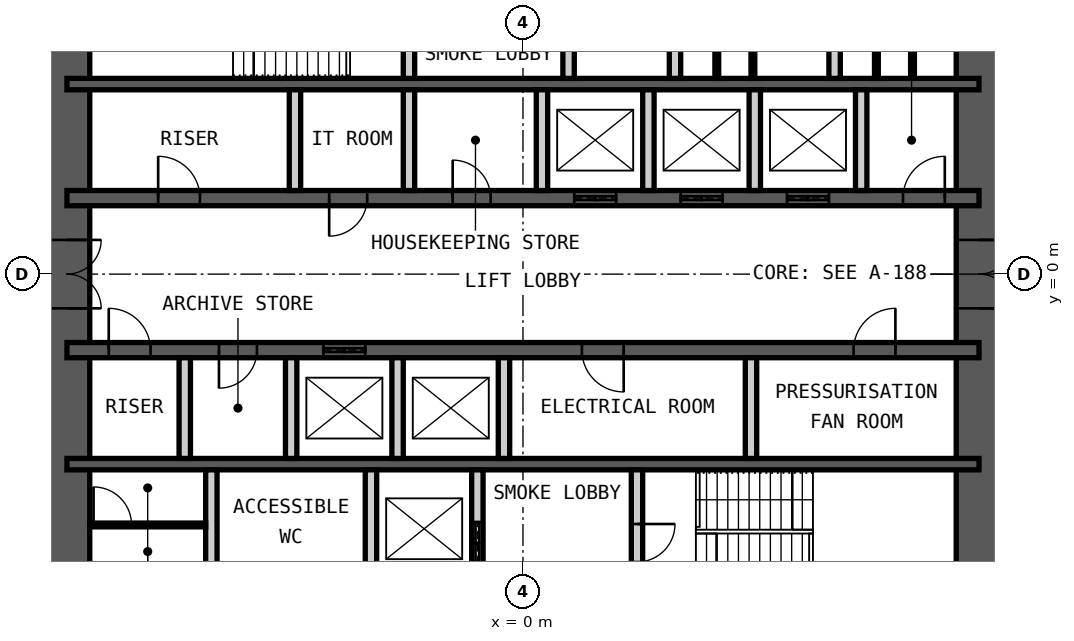
"""IFC4 building model, lengths in metres.
Left out: names, types, materials, properties, quantities, classifications, styles, units other than length and angle.
Written with IfcOpenShell. Run it as: python <this file> out.ifc"""

import sys

from ifc_helpers import new_model, si_unit, direction, frame, frame_2d, origin, place, context, subcontext, project, spatial, rectangle, extrude, element, fill, save


model = new_model("IFC4")
c1 = context("Model", 3, precision=1e-05, world=origin(), true_north=direction((0.0, 1.0)))
c2 = subcontext(c1, "Body", "Model", "MODEL_VIEW")
j1 = project(units=[si_unit("LENGTHUNIT", "METRE"), si_unit("PLANEANGLEUNIT", "RADIAN")], contexts=[c1])
p1 = place(None, origin())
s1 = spatial("IfcSite", under=j1, at=p1, CompositionType="ELEMENT")
p2 = place(p1, origin())
s2 = spatial("IfcBuilding", under=s1, at=p2, CompositionType="ELEMENT")
p3 = place(p2, frame((0.0, 0.0, 180.4)))
s3 = spatial("IfcBuildingStorey", under=s2, at=p3, CompositionType="ELEMENT", Elevation=180.4)
p4 = place(p3, frame((12.0, -9.0, 0.0), z_axis=(0.0, 0.0, 1.0), x_axis=(0.0, 1.0, 0.0)))
e1 = element("IfcWall", 1, at=p4, inside=s3, PredefinedType="SHEAR", context=c2, shape_type="SweptSolid", body=[
    extrude(rectangle(XDim=18.0, YDim=1.2, at=frame_2d((9.0, 0.0))), origin(), (0.0, 0.0, 1.0), 4.2),
])
p5 = place(p4, frame((8.1, 0.0, 0.0)))
e2 = element("IfcOpeningElement", 2, at=p5, cuts=e1, PredefinedType="OPENING", context=c2, shape_type="SweptSolid", body=[
    extrude(rectangle(XDim=1.8, YDim=2.1, at=frame_2d((0.9, 1.05))), frame((0.0, 0.61, 0.0), z_axis=(0.0, -1.0, 0.0), x_axis=(1.0, 0.0, 0.0)), (0.0, 0.0, 1.0), 1.22),
])
p6 = place(p3, frame((-12.0, -9.0, 0.0), z_axis=(0.0, 0.0, 1.0), x_axis=(0.0, 1.0, 0.0)))
e3 = element("IfcWall", 3, at=p6, inside=s3, PredefinedType="SHEAR", context=c2, shape_type="SweptSolid", body=[
    extrude(rectangle(XDim=18.0, YDim=1.2, at=frame_2d((9.0, 0.0))), origin(), (0.0, 0.0, 1.0), 4.2),
])
p7 = place(p6, frame((8.1, 0.0, 0.0)))
e4 = element("IfcOpeningElement", 4, at=p7, cuts=e3, PredefinedType="OPENING", context=c2, shape_type="SweptSolid", body=[
    extrude(rectangle(XDim=1.8, YDim=2.1, at=frame_2d((0.9, 1.05))), frame((0.0, 0.61, 0.0), z_axis=(0.0, -1.0, 0.0), x_axis=(1.0, 0.0, 0.0)), (0.0, 0.0, 1.0), 1.22),
])
p8 = place(p3, frame((-12.0, 5.0, 0.0), z_axis=(0.0, 0.0, 1.0), x_axis=(1.0, 0.0, 0.0)))
e5 = element("IfcWall", 5, at=p8, inside=s3, PredefinedType="SHEAR", context=c2, shape_type="SweptSolid", body=[
    extrude(rectangle(XDim=24.0, YDim=0.3, at=frame_2d((12.0, 0.0))), origin(), (0.0, 0.0, 1.0), 4.2),
])
p9 = place(p3, frame((-12.0, 2.0, 0.0), z_axis=(0.0, 0.0, 1.0), x_axis=(1.0, 0.0, 0.0)))
e6 = element("IfcWall", 6, at=p9, inside=s3, PredefinedType="SHEAR", context=c2, shape_type="SweptSolid", body=[
    extrude(rectangle(XDim=24.0, YDim=0.4, at=frame_2d((12.0, 0.0))), origin(), (0.0, 0.0, 1.0), 4.2),
])
p10 = place(p9, frame((2.4, 0.0, 0.0)))
e7 = element("IfcOpeningElement", 7, at=p10, cuts=e6, PredefinedType="OPENING", context=c2, shape_type="SweptSolid", body=[
    extrude(rectangle(XDim=1.1, YDim=2.1, at=frame_2d((0.55, 1.05))), frame((0.0, 0.21, 0.0), z_axis=(0.0, -1.0, 0.0), x_axis=(1.0, 0.0, 0.0)), (0.0, 0.0, 1.0), 0.42),
])
p11 = place(p9, frame((22.0, 0.0, 0.0)))
e8 = element("IfcOpeningElement", 8, at=p11, cuts=e6, PredefinedType="OPENING", context=c2, shape_type="SweptSolid", body=[
    extrude(rectangle(XDim=1.1, YDim=2.1, at=frame_2d((0.55, 1.05))), frame((0.0, 0.21, 0.0), z_axis=(0.0, -1.0, 0.0), x_axis=(1.0, 0.0, 0.0)), (0.0, 0.0, 1.0), 0.42),
])
p12 = place(p9, frame((10.15, 0.0, 0.0)))
e9 = element("IfcOpeningElement", 9, at=p12, cuts=e6, PredefinedType="OPENING", context=c2, shape_type="SweptSolid", body=[
    extrude(rectangle(XDim=1.0, YDim=2.1, at=frame_2d((0.5, 1.05))), frame((0.0, 0.21, 0.0), z_axis=(0.0, -1.0, 0.0), x_axis=(1.0, 0.0, 0.0)), (0.0, 0.0, 1.0), 0.42),
])
p13 = place(p9, frame((6.9, 0.0, 0.0)))
e10 = element("IfcOpeningElement", 10, at=p13, cuts=e6, PredefinedType="OPENING", context=c2, shape_type="SweptSolid", body=[
    extrude(rectangle(XDim=1.0, YDim=2.1, at=frame_2d((0.5, 1.05))), frame((0.0, 0.21, 0.0), z_axis=(0.0, -1.0, 0.0), x_axis=(1.0, 0.0, 0.0)), (0.0, 0.0, 1.0), 0.42),
])
p14 = place(p9, frame((13.35, 0.0, 0.0)))
e11 = element("IfcOpeningElement", 11, at=p14, cuts=e6, PredefinedType="OPENING", context=c2, shape_type="SweptSolid", body=[
    extrude(rectangle(XDim=1.1, YDim=2.4, at=frame_2d((0.55, 1.2))), frame((0.0, 0.21, 0.0), z_axis=(0.0, -1.0, 0.0), x_axis=(1.0, 0.0, 0.0)), (0.0, 0.0, 1.0), 0.42),
])
p15 = place(p9, frame((16.15, 0.0, 0.0)))
e12 = element("IfcOpeningElement", 12, at=p15, cuts=e6, PredefinedType="OPENING", context=c2, shape_type="SweptSolid", body=[
    extrude(rectangle(XDim=1.1, YDim=2.4, at=frame_2d((0.55, 1.2))), frame((0.0, 0.21, 0.0), z_axis=(0.0, -1.0, 0.0), x_axis=(1.0, 0.0, 0.0)), (0.0, 0.0, 1.0), 0.42),
])
p16 = place(p9, frame((18.95, 0.0, 0.0)))
e13 = element("IfcOpeningElement", 13, at=p16, cuts=e6, PredefinedType="OPENING", context=c2, shape_type="SweptSolid", body=[
    extrude(rectangle(XDim=1.1, YDim=2.4, at=frame_2d((0.55, 1.2))), frame((0.0, 0.21, 0.0), z_axis=(0.0, -1.0, 0.0), x_axis=(1.0, 0.0, 0.0)), (0.0, 0.0, 1.0), 0.42),
])
p17 = place(p3, frame((-12.0, -2.0, 0.0), z_axis=(0.0, 0.0, 1.0), x_axis=(1.0, 0.0, 0.0)))
e14 = element("IfcWall", 14, at=p17, inside=s3, PredefinedType="SHEAR", context=c2, shape_type="SweptSolid", body=[
    extrude(rectangle(XDim=24.0, YDim=0.4, at=frame_2d((12.0, 0.0))), origin(), (0.0, 0.0, 1.0), 4.2),
])
p18 = place(p17, frame((1.1, 0.0, 0.0)))
e15 = element("IfcOpeningElement", 15, at=p18, cuts=e14, PredefinedType="OPENING", context=c2, shape_type="SweptSolid", body=[
    extrude(rectangle(XDim=1.1, YDim=2.1, at=frame_2d((0.55, 1.05))), frame((0.0, 0.21, 0.0), z_axis=(0.0, -1.0, 0.0), x_axis=(1.0, 0.0, 0.0)), (0.0, 0.0, 1.0), 0.42),
])
p19 = place(p17, frame((13.55, 0.0, 0.0)))
e16 = element("IfcOpeningElement", 16, at=p19, cuts=e14, PredefinedType="OPENING", context=c2, shape_type="SweptSolid", body=[
    extrude(rectangle(XDim=1.1, YDim=2.1, at=frame_2d((0.55, 1.05))), frame((0.0, 0.21, 0.0), z_axis=(0.0, -1.0, 0.0), x_axis=(1.0, 0.0, 0.0)), (0.0, 0.0, 1.0), 0.42),
])
p20 = place(p17, frame((20.7, 0.0, 0.0)))
e17 = element("IfcOpeningElement", 17, at=p20, cuts=e14, PredefinedType="OPENING", context=c2, shape_type="SweptSolid", body=[
    extrude(rectangle(XDim=1.1, YDim=2.1, at=frame_2d((0.55, 1.05))), frame((0.0, 0.21, 0.0), z_axis=(0.0, -1.0, 0.0), x_axis=(1.0, 0.0, 0.0)), (0.0, 0.0, 1.0), 0.42),
])
p21 = place(p17, frame((4.0, 0.0, 0.0)))
e18 = element("IfcOpeningElement", 18, at=p21, cuts=e14, PredefinedType="OPENING", context=c2, shape_type="SweptSolid", body=[
    extrude(rectangle(XDim=1.0, YDim=2.1, at=frame_2d((0.5, 1.05))), frame((0.0, 0.21, 0.0), z_axis=(0.0, -1.0, 0.0), x_axis=(1.0, 0.0, 0.0)), (0.0, 0.0, 1.0), 0.42),
])
p22 = place(p17, frame((6.75, 0.0, 0.0)))
e19 = element("IfcOpeningElement", 19, at=p22, cuts=e14, PredefinedType="OPENING", context=c2, shape_type="SweptSolid", body=[
    extrude(rectangle(XDim=1.1, YDim=2.4, at=frame_2d((0.55, 1.2))), frame((0.0, 0.21, 0.0), z_axis=(0.0, -1.0, 0.0), x_axis=(1.0, 0.0, 0.0)), (0.0, 0.0, 1.0), 0.42),
])
p23 = place(p3, frame((-12.0, -5.0, 0.0), z_axis=(0.0, 0.0, 1.0), x_axis=(1.0, 0.0, 0.0)))
e20 = element("IfcWall", 20, at=p23, inside=s3, PredefinedType="SHEAR", context=c2, shape_type="SweptSolid", body=[
    extrude(rectangle(XDim=24.0, YDim=0.3, at=frame_2d((12.0, 0.0))), origin(), (0.0, 0.0, 1.0), 4.2),
])
p24 = place(p3, frame((-3.0, 5.15, 0.0), z_axis=(0.0, 0.0, 1.0), x_axis=(0.0, 1.0, 0.0)))
e21 = element("IfcWall", 21, at=p24, inside=s3, PredefinedType="PARTITIONING", context=c2, shape_type="SweptSolid", body=[
    extrude(rectangle(XDim=3.85, YDim=0.3, at=frame_2d((1.925, 0.0))), origin(), (0.0, 0.0, 1.0), 3.98),
])
p25 = place(p24, frame((1.425, 0.0, 0.0)))
e22 = element("IfcOpeningElement", 22, at=p25, cuts=e21, PredefinedType="OPENING", context=c2, shape_type="SweptSolid", body=[
    extrude(rectangle(XDim=1.0, YDim=2.1, at=frame_2d((0.5, 1.05))), frame((0.0, 0.16, 0.0), z_axis=(0.0, -1.0, 0.0), x_axis=(1.0, 0.0, 0.0)), (0.0, 0.0, 1.0), 0.32),
])
p26 = place(p3, frame((1.2, 5.15, 0.0), z_axis=(0.0, 0.0, 1.0), x_axis=(0.0, 1.0, 0.0)))
e23 = element("IfcWall", 23, at=p26, inside=s3, PredefinedType="PARTITIONING", context=c2, shape_type="SweptSolid", body=[
    extrude(rectangle(XDim=3.85, YDim=0.3, at=frame_2d((1.925, 0.0))), origin(), (0.0, 0.0, 1.0), 3.98),
])
p27 = place(p26, frame((1.375, 0.0, 0.0)))
e24 = element("IfcOpeningElement", 24, at=p27, cuts=e23, PredefinedType="OPENING", context=c2, shape_type="SweptSolid", body=[
    extrude(rectangle(XDim=1.1, YDim=2.4, at=frame_2d((0.55, 1.2))), frame((0.0, 0.16, 0.0), z_axis=(0.0, -1.0, 0.0), x_axis=(1.0, 0.0, 0.0)), (0.0, 0.0, 1.0), 0.32),
])
for number, where, z_axis, x_axis in (
    (25, (4.0, 5.15, 0.0), (0.0, 0.0, 1.0), (0.0, 1.0, 0.0)),
    (26, (8.2, 5.15, 0.0), (0.0, 0.0, 1.0), (0.0, 1.0, 0.0)),
):
    element("IfcWall", number, at=place(p3, frame(where, z_axis=z_axis, x_axis=x_axis)), inside=s3, PredefinedType="PARTITIONING", context=c2, shape_type="SweptSolid", body=[
        extrude(rectangle(XDim=3.85, YDim=0.3, at=frame_2d((1.925, 0.0))), origin(), (0.0, 0.0, 1.0), 3.98),
    ])
for number, where, z_axis, x_axis in (
    (27, (-6.0, 2.2, 0.0), (0.0, 0.0, 1.0), (0.0, 1.0, 0.0)),
    (28, (-3.0, 2.2, 0.0), (0.0, 0.0, 1.0), (0.0, 1.0, 0.0)),
    (29, (0.5, 2.2, 0.0), (0.0, 0.0, 1.0), (0.0, 1.0, 0.0)),
    (30, (3.3, 2.2, 0.0), (0.0, 0.0, 1.0), (0.0, 1.0, 0.0)),
    (31, (6.1, 2.2, 0.0), (0.0, 0.0, 1.0), (0.0, 1.0, 0.0)),
    (32, (8.9, 2.2, 0.0), (0.0, 0.0, 1.0), (0.0, 1.0, 0.0)),
    (33, (-8.9, -4.85, 0.0), (0.0, 0.0, 1.0), (0.0, 1.0, 0.0)),
    (34, (-6.1, -4.85, 0.0), (0.0, 0.0, 1.0), (0.0, 1.0, 0.0)),
    (35, (-3.3, -4.85, 0.0), (0.0, 0.0, 1.0), (0.0, 1.0, 0.0)),
    (36, (-0.5, -4.85, 0.0), (0.0, 0.0, 1.0), (0.0, 1.0, 0.0)),
    (37, (6.0, -4.85, 0.0), (0.0, 0.0, 1.0), (0.0, 1.0, 0.0)),
):
    element("IfcWall", number, at=place(p3, frame(where, z_axis=z_axis, x_axis=x_axis)), inside=s3, PredefinedType="PARTITIONING", context=c2, shape_type="SweptSolid", body=[
        extrude(rectangle(XDim=2.65, YDim=0.3, at=frame_2d((1.325, 0.0))), origin(), (0.0, 0.0, 1.0), 3.98),
    ])
for number, where, z_axis, x_axis in (
    (38, (-8.2, -9.0, 0.0), (0.0, 0.0, 1.0), (0.0, 1.0, 0.0)),
    (39, (-4.0, -9.0, 0.0), (0.0, 0.0, 1.0), (0.0, 1.0, 0.0)),
):
    element("IfcWall", number, at=place(p3, frame(where, z_axis=z_axis, x_axis=x_axis)), inside=s3, PredefinedType="PARTITIONING", context=c2, shape_type="SweptSolid", body=[
        extrude(rectangle(XDim=3.85, YDim=0.3, at=frame_2d((1.925, 0.0))), origin(), (0.0, 0.0, 1.0), 3.98),
    ])
p28 = place(p3, frame((-1.2, -9.0, 0.0), z_axis=(0.0, 0.0, 1.0), x_axis=(0.0, 1.0, 0.0)))
e40 = element("IfcWall", 40, at=p28, inside=s3, PredefinedType="PARTITIONING", context=c2, shape_type="SweptSolid", body=[
    extrude(rectangle(XDim=3.85, YDim=0.3, at=frame_2d((1.925, 0.0))), origin(), (0.0, 0.0, 1.0), 3.98),
])
p29 = place(p28, frame((1.375, 0.0, 0.0)))
e41 = element("IfcOpeningElement", 41, at=p29, cuts=e40, PredefinedType="OPENING", context=c2, shape_type="SweptSolid", body=[
    extrude(rectangle(XDim=1.1, YDim=2.4, at=frame_2d((0.55, 1.2))), frame((0.0, 0.16, 0.0), z_axis=(0.0, -1.0, 0.0), x_axis=(1.0, 0.0, 0.0)), (0.0, 0.0, 1.0), 0.32),
])
p30 = place(p3, frame((3.0, -9.0, 0.0), z_axis=(0.0, 0.0, 1.0), x_axis=(0.0, 1.0, 0.0)))
e42 = element("IfcWall", 42, at=p30, inside=s3, PredefinedType="PARTITIONING", context=c2, shape_type="SweptSolid", body=[
    extrude(rectangle(XDim=3.85, YDim=0.3, at=frame_2d((1.925, 0.0))), origin(), (0.0, 0.0, 1.0), 3.98),
])
p31 = place(p30, frame((1.425, 0.0, 0.0)))
e43 = element("IfcOpeningElement", 43, at=p31, cuts=e42, PredefinedType="OPENING", context=c2, shape_type="SweptSolid", body=[
    extrude(rectangle(XDim=1.0, YDim=2.1, at=frame_2d((0.5, 1.05))), frame((0.0, 0.16, 0.0), z_axis=(0.0, -1.0, 0.0), x_axis=(1.0, 0.0, 0.0)), (0.0, 0.0, 1.0), 0.32),
])
p32 = place(p3, frame((-11.4, -6.6, 0.0), z_axis=(0.0, 0.0, 1.0), x_axis=(1.0, 0.0, 0.0)))
e44 = element("IfcWall", 44, at=p32, inside=s3, PredefinedType="PARTITIONING", context=c2, shape_type="SweptSolid", body=[
    extrude(rectangle(XDim=3.05, YDim=0.1, at=frame_2d((1.525, 0.0))), origin(), (0.0, 0.0, 1.0), 3.98),
])
p33 = place(p32, frame((0.1, 0.0, 0.0)))
e45 = element("IfcOpeningElement", 45, at=p33, cuts=e44, PredefinedType="OPENING", context=c2, shape_type="SweptSolid", body=[
    extrude(rectangle(XDim=1.0, YDim=2.4, at=frame_2d((0.5, 1.2))), frame((0.0, 0.06, 0.0), z_axis=(0.0, -1.0, 0.0), x_axis=(1.0, 0.0, 0.0)), (0.0, 0.0, 1.0), 0.12),
])
for number, where, z_axis, x_axis in (
    (46, (5.1, 5.15, 0.0), (0.0, 0.0, 1.0), (0.0, 1.0, 0.0)),
    (47, (6.05, 5.15, 0.0), (0.0, 0.0, 1.0), (0.0, 1.0, 0.0)),
    (48, (9.3, 5.15, 0.0), (0.0, 0.0, 1.0), (0.0, 1.0, 0.0)),
    (49, (10.25, 5.15, 0.0), (0.0, 0.0, 1.0), (0.0, 1.0, 0.0)),
):
    element("IfcWall", number, at=place(p3, frame(where, z_axis=z_axis, x_axis=x_axis)), inside=s3, PredefinedType="PARTITIONING", context=c2, shape_type="SweptSolid", body=[
        extrude(rectangle(XDim=1.5, YDim=0.1, at=frame_2d((0.75, 0.0))), origin(), (0.0, 0.0, 1.0), 2.1),
    ])
p34 = place(p31, origin())
e50 = element("IfcDoor", 50, at=p34, inside=s3, OperationType="SINGLE_SWING_RIGHT", PredefinedType="DOOR", context=c2, shape_type="SweptSolid", body=[
    extrude(rectangle(XDim=1.0, YDim=2.1, at=frame_2d((0.5, 1.05))), frame((0.0, 0.025, 0.0), z_axis=(0.0, -1.0, 0.0), x_axis=(1.0, 0.0, 0.0)), (0.0, 0.0, 1.0), 0.05),
])
fill(e43, e50)
p35 = place(p10, origin())
e51 = element("IfcDoor", 51, at=p35, inside=s3, OperationType="SINGLE_SWING_RIGHT", PredefinedType="DOOR", context=c2, shape_type="SweptSolid", body=[
    extrude(rectangle(XDim=1.1, YDim=2.1, at=frame_2d((0.55, 1.05))), frame((0.0, 0.025, 0.0), z_axis=(0.0, -1.0, 0.0), x_axis=(1.0, 0.0, 0.0)), (0.0, 0.0, 1.0), 0.05),
])
fill(e7, e51)
p36 = place(p18, origin())
e52 = element("IfcDoor", 52, at=p36, inside=s3, OperationType="SINGLE_SWING_RIGHT", PredefinedType="DOOR", context=c2, shape_type="SweptSolid", body=[
    extrude(rectangle(XDim=1.1, YDim=2.1, at=frame_2d((0.55, 1.05))), frame((0.0, 0.025, 0.0), z_axis=(0.0, -1.0, 0.0), x_axis=(1.0, 0.0, 0.0)), (0.0, 0.0, 1.0), 0.05),
])
fill(e15, e52)
p37 = place(p11, origin())
e53 = element("IfcDoor", 53, at=p37, inside=s3, OperationType="SINGLE_SWING_LEFT", PredefinedType="DOOR", context=c2, shape_type="SweptSolid", body=[
    extrude(rectangle(XDim=1.1, YDim=2.1, at=frame_2d((0.55, 1.05))), frame((0.0, 0.025, 0.0), z_axis=(0.0, -1.0, 0.0), x_axis=(1.0, 0.0, 0.0)), (0.0, 0.0, 1.0), 0.05),
])
fill(e8, e53)
p38 = place(p12, origin())
e54 = element("IfcDoor", 54, at=p38, inside=s3, OperationType="SINGLE_SWING_RIGHT", PredefinedType="DOOR", context=c2, shape_type="SweptSolid", body=[
    extrude(rectangle(XDim=1.0, YDim=2.1, at=frame_2d((0.5, 1.05))), frame((0.0, 0.025, 0.0), z_axis=(0.0, -1.0, 0.0), x_axis=(1.0, 0.0, 0.0)), (0.0, 0.0, 1.0), 0.05),
])
fill(e9, e54)
p39 = place(p19, origin())
e55 = element("IfcDoor", 55, at=p39, inside=s3, OperationType="SINGLE_SWING_RIGHT", PredefinedType="DOOR", context=c2, shape_type="SweptSolid", body=[
    extrude(rectangle(XDim=1.1, YDim=2.1, at=frame_2d((0.55, 1.05))), frame((0.0, 0.025, 0.0), z_axis=(0.0, -1.0, 0.0), x_axis=(1.0, 0.0, 0.0)), (0.0, 0.0, 1.0), 0.05),
])
fill(e16, e55)
p40 = place(p20, origin())
e56 = element("IfcDoor", 56, at=p40, inside=s3, OperationType="SINGLE_SWING_LEFT", PredefinedType="DOOR", context=c2, shape_type="SweptSolid", body=[
    extrude(rectangle(XDim=1.1, YDim=2.1, at=frame_2d((0.55, 1.05))), frame((0.0, 0.025, 0.0), z_axis=(0.0, -1.0, 0.0), x_axis=(1.0, 0.0, 0.0)), (0.0, 0.0, 1.0), 0.05),
])
fill(e17, e56)
p41 = place(p5, origin())
e57 = element("IfcDoor", 57, at=p41, inside=s3, OperationType="DOUBLE_DOOR_DOUBLE_SWING", PredefinedType="DOOR", context=c2, shape_type="SweptSolid", body=[
    extrude(rectangle(XDim=1.8, YDim=2.1, at=frame_2d((0.9, 1.05))), frame((0.0, 0.025, 0.0), z_axis=(0.0, -1.0, 0.0), x_axis=(1.0, 0.0, 0.0)), (0.0, 0.0, 1.0), 0.05),
])
fill(e2, e57)
p42 = place(p7, origin())
e58 = element("IfcDoor", 58, at=p42, inside=s3, OperationType="DOUBLE_DOOR_DOUBLE_SWING", PredefinedType="DOOR", context=c2, shape_type="SweptSolid", body=[
    extrude(rectangle(XDim=1.8, YDim=2.1, at=frame_2d((0.9, 1.05))), frame((0.0, 0.025, 0.0), z_axis=(0.0, -1.0, 0.0), x_axis=(1.0, 0.0, 0.0)), (0.0, 0.0, 1.0), 0.05),
])
fill(e4, e58)
p43 = place(p29, origin())
e59 = element("IfcDoor", 59, at=p43, inside=s3, OperationType="DOUBLE_DOOR_SLIDING", PredefinedType="DOOR", context=c2, shape_type="SweptSolid", body=[
    extrude(rectangle(XDim=1.1, YDim=2.4, at=frame_2d((0.55, 1.2))), frame((0.0, 0.025, 0.0), z_axis=(0.0, -1.0, 0.0), x_axis=(1.0, 0.0, 0.0)), (0.0, 0.0, 1.0), 0.05),
])
fill(e41, e59)
p44 = place(p13, origin())
e60 = element("IfcDoor", 60, at=p44, inside=s3, OperationType="SINGLE_SWING_LEFT", PredefinedType="DOOR", context=c2, shape_type="SweptSolid", body=[
    extrude(rectangle(XDim=1.0, YDim=2.1, at=frame_2d((0.5, 1.05))), frame((0.0, 0.025, 0.0), z_axis=(0.0, -1.0, 0.0), x_axis=(1.0, 0.0, 0.0)), (0.0, 0.0, 1.0), 0.05),
])
fill(e10, e60)
p45 = place(p14, origin())
e61 = element("IfcDoor", 61, at=p45, inside=s3, OperationType="DOUBLE_DOOR_SLIDING", PredefinedType="DOOR", context=c2, shape_type="SweptSolid", body=[
    extrude(rectangle(XDim=1.1, YDim=2.4, at=frame_2d((0.55, 1.2))), frame((0.0, 0.025, 0.0), z_axis=(0.0, -1.0, 0.0), x_axis=(1.0, 0.0, 0.0)), (0.0, 0.0, 1.0), 0.05),
])
fill(e11, e61)
p46 = place(p15, origin())
e62 = element("IfcDoor", 62, at=p46, inside=s3, OperationType="DOUBLE_DOOR_SLIDING", PredefinedType="DOOR", context=c2, shape_type="SweptSolid", body=[
    extrude(rectangle(XDim=1.1, YDim=2.4, at=frame_2d((0.55, 1.2))), frame((0.0, 0.025, 0.0), z_axis=(0.0, -1.0, 0.0), x_axis=(1.0, 0.0, 0.0)), (0.0, 0.0, 1.0), 0.05),
])
fill(e12, e62)
p47 = place(p16, origin())
e63 = element("IfcDoor", 63, at=p47, inside=s3, OperationType="DOUBLE_DOOR_SLIDING", PredefinedType="DOOR", context=c2, shape_type="SweptSolid", body=[
    extrude(rectangle(XDim=1.1, YDim=2.4, at=frame_2d((0.55, 1.2))), frame((0.0, 0.025, 0.0), z_axis=(0.0, -1.0, 0.0), x_axis=(1.0, 0.0, 0.0)), (0.0, 0.0, 1.0), 0.05),
])
fill(e13, e63)
p48 = place(p21, origin())
e64 = element("IfcDoor", 64, at=p48, inside=s3, OperationType="SINGLE_SWING_LEFT", PredefinedType="DOOR", context=c2, shape_type="SweptSolid", body=[
    extrude(rectangle(XDim=1.0, YDim=2.1, at=frame_2d((0.5, 1.05))), frame((0.0, 0.025, 0.0), z_axis=(0.0, -1.0, 0.0), x_axis=(1.0, 0.0, 0.0)), (0.0, 0.0, 1.0), 0.05),
])
fill(e18, e64)
p49 = place(p22, origin())
e65 = element("IfcDoor", 65, at=p49, inside=s3, OperationType="DOUBLE_DOOR_SLIDING", PredefinedType="DOOR", context=c2, shape_type="SweptSolid", body=[
    extrude(rectangle(XDim=1.1, YDim=2.4, at=frame_2d((0.55, 1.2))), frame((0.0, 0.025, 0.0), z_axis=(0.0, -1.0, 0.0), x_axis=(1.0, 0.0, 0.0)), (0.0, 0.0, 1.0), 0.05),
])
fill(e19, e65)
p50 = place(p33, origin())
e66 = element("IfcDoor", 66, at=p50, inside=s3, OperationType="SINGLE_SWING_RIGHT", PredefinedType="DOOR", context=c2, shape_type="SweptSolid", body=[
    extrude(rectangle(XDim=1.0, YDim=2.4, at=frame_2d((0.5, 1.2))), frame((0.0, 0.025, 0.0), z_axis=(0.0, -1.0, 0.0), x_axis=(1.0, 0.0, 0.0)), (0.0, 0.0, 1.0), 0.05),
])
fill(e45, e66)
save(model, sys.argv[1])
